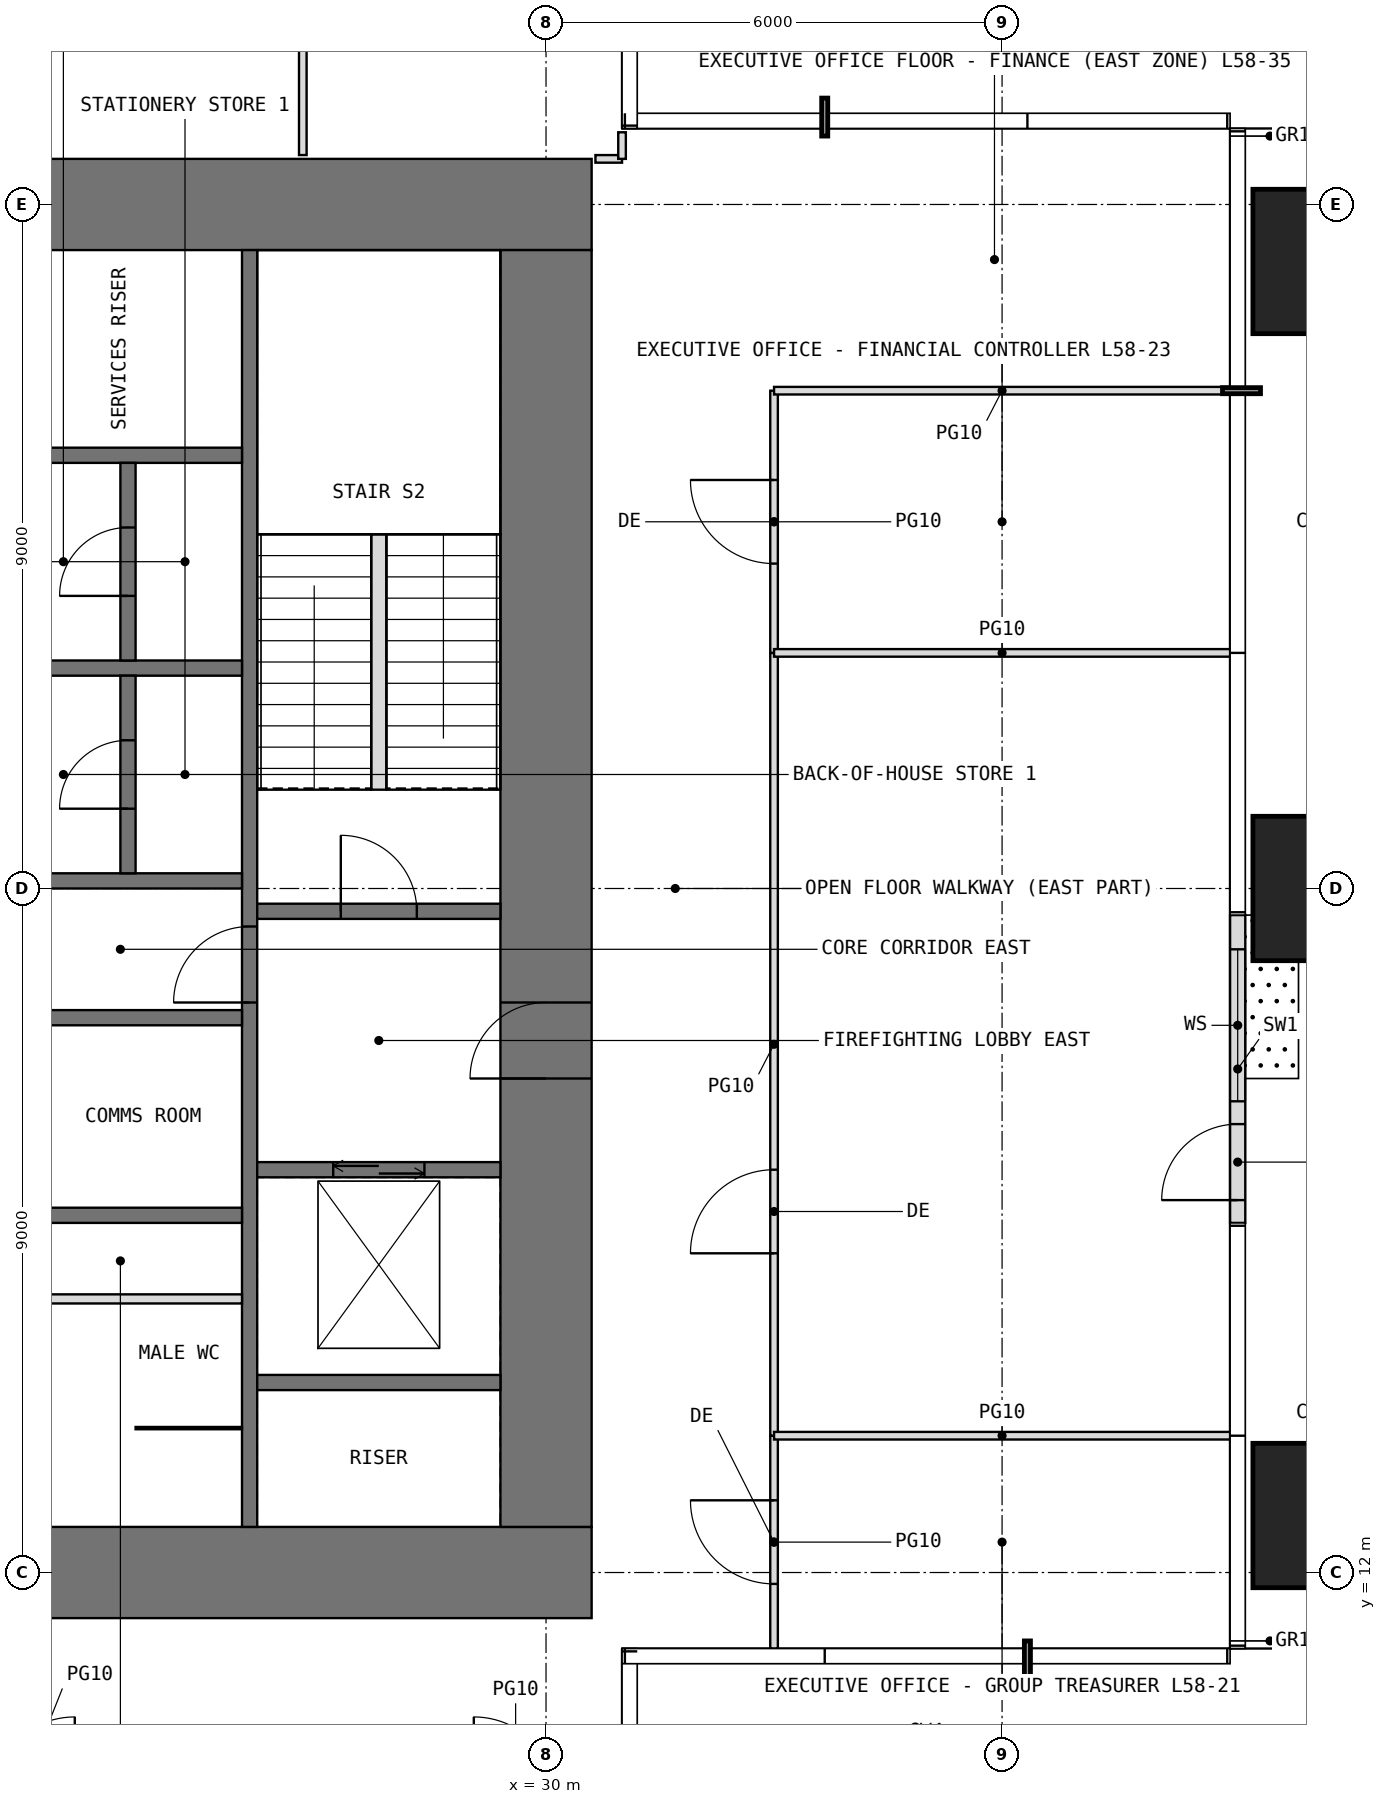
"""IFC4 building model, lengths in metres.
Left out: names, types, materials, properties, quantities, classifications, styles, units other than length and angle.
Written with IfcOpenShell. Run it as: python <this file> out.ifc"""

import sys

from ifc_helpers import new_model, si_unit, direction, frame, frame_2d, origin, origin_2d, place, context, subcontext, project, spatial, rectangle, extrude, element, fill, save


model = new_model("IFC4")
c1 = context("Model", 3, precision=1e-05, world=origin(), true_north=direction((0.0, 1.0)))
c2 = subcontext(c1, "Body", "Model", "MODEL_VIEW")
j1 = project(units=[si_unit("LENGTHUNIT", "METRE"), si_unit("PLANEANGLEUNIT", "RADIAN")], contexts=[c1])
p1 = place(None, origin())
s1 = spatial("IfcSite", under=j1, at=p1, CompositionType="ELEMENT")
p2 = place(p1, origin())
s2 = spatial("IfcBuilding", under=s1, at=p2, CompositionType="ELEMENT")
p3 = place(p2, frame((0.0, 0.0, 244.0)))
s3 = spatial("IfcBuildingStorey", under=s2, at=p3, CompositionType="ELEMENT", Elevation=244.0)
for number, where, z_axis, x_axis in (
    (1, (40.25, 12.75, 0.0), (0.0, 0.0, 1.0), (1.0, 0.0, 0.0)),
    (2, (40.25, 21.0, 0.0), (0.0, 0.0, 1.0), (1.0, 0.0, 0.0)),
    (3, (40.25, 29.25, 0.0), (0.0, 0.0, 1.0), (1.0, 0.0, 0.0)),
):
    element("IfcColumn", number, at=place(p3, frame(where, z_axis=z_axis, x_axis=x_axis)), inside=s3, PredefinedType="COLUMN", context=c2, shape_type="SweptSolid", body=[
        extrude(rectangle(XDim=1.9, YDim=1.9, at=origin_2d()), origin(), (0.0, 0.0, 1.0), 4.2),
    ])
p4 = place(p3, frame((39.1, 16.6, 0.0), z_axis=(0.0, 0.0, 1.0), x_axis=(0.0, 1.0, 0.0)))
e4 = element("IfcWall", 4, at=p4, inside=s3, PredefinedType="USERDEFINED", context=c2, shape_type="SweptSolid", body=[
    extrude(rectangle(XDim=4.05, YDim=0.2, at=frame_2d((2.025, 0.0))), origin(), (0.0, 0.0, 1.0), 3.95),
])
p5 = place(p4, frame((0.3, 0.0, 0.0)))
e5 = element("IfcOpeningElement", 5, at=p5, cuts=e4, PredefinedType="OPENING", context=c2, shape_type="SweptSolid", body=[
    extrude(rectangle(XDim=1.0, YDim=2.4, at=frame_2d((0.5, 1.2))), frame((0.0, 0.11, 0.0), z_axis=(0.0, -1.0, 0.0), x_axis=(1.0, 0.0, 0.0)), (0.0, 0.0, 1.0), 0.22),
])
p6 = place(p4, frame((1.6, 0.0, 0.3)))
e6 = element("IfcOpeningElement", 6, at=p6, cuts=e4, PredefinedType="OPENING", context=c2, shape_type="SweptSolid", body=[
    extrude(rectangle(XDim=2.0, YDim=2.7, at=frame_2d((1.0, 1.35))), frame((0.0, 0.11, 0.0), z_axis=(0.0, -1.0, 0.0), x_axis=(1.0, 0.0, 0.0)), (0.0, 0.0, 1.0), 0.22),
])
p7 = place(p3, frame((11.4, 12.0, -0.05), z_axis=(0.0, 0.0, 1.0), x_axis=(1.0, 0.0, 0.0)))
e7 = element("IfcWall", 7, at=p7, inside=s3, PredefinedType="SHEAR", context=c2, shape_type="SweptSolid", body=[
    extrude(rectangle(XDim=19.2, YDim=1.2, at=frame_2d((9.6, 0.0))), origin(), (0.0, 0.0, 1.0), 4.2),
])
p8 = place(p7, frame((8.6, 0.0, 0.05)))
e8 = element("IfcOpeningElement", 8, at=p8, cuts=e7, PredefinedType="OPENING", context=c2, shape_type="SweptSolid", body=[
    extrude(rectangle(XDim=2.0, YDim=2.2, at=frame_2d((1.0, 1.1))), frame((0.0, 0.61, 0.0), z_axis=(0.0, -1.0, 0.0), x_axis=(1.0, 0.0, 0.0)), (0.0, 0.0, 1.0), 1.22),
])
p9 = place(p3, frame((11.4, 30.0, -0.05), z_axis=(0.0, 0.0, 1.0), x_axis=(1.0, 0.0, 0.0)))
e9 = element("IfcWall", 9, at=p9, inside=s3, PredefinedType="SHEAR", context=c2, shape_type="SweptSolid", body=[
    extrude(rectangle(XDim=19.2, YDim=1.2, at=frame_2d((9.6, 0.0))), origin(), (0.0, 0.0, 1.0), 4.2),
])
p10 = place(p9, frame((8.6, 0.0, 0.05)))
e10 = element("IfcOpeningElement", 10, at=p10, cuts=e9, PredefinedType="OPENING", context=c2, shape_type="SweptSolid", body=[
    extrude(rectangle(XDim=2.0, YDim=2.2, at=frame_2d((1.0, 1.1))), frame((0.0, 0.61, 0.0), z_axis=(0.0, -1.0, 0.0), x_axis=(1.0, 0.0, 0.0)), (0.0, 0.0, 1.0), 1.22),
])
p11 = place(p3, frame((30.0, 12.6, -0.05), z_axis=(0.0, 0.0, 1.0), x_axis=(0.0, 1.0, 0.0)))
e11 = element("IfcWall", 11, at=p11, inside=s3, PredefinedType="SHEAR", context=c2, shape_type="SweptSolid", body=[
    extrude(rectangle(XDim=16.8, YDim=1.2, at=frame_2d((8.4, 0.0))), origin(), (0.0, 0.0, 1.0), 4.2),
])
p12 = place(p11, frame((5.9, 0.0, 0.05)))
e12 = element("IfcOpeningElement", 12, at=p12, cuts=e11, PredefinedType="OPENING", context=c2, shape_type="SweptSolid", body=[
    extrude(rectangle(XDim=1.0, YDim=2.2, at=frame_2d((0.5, 1.1))), frame((0.0, 0.61, 0.0), z_axis=(0.0, -1.0, 0.0), x_axis=(1.0, 0.0, 0.0)), (0.0, 0.0, 1.0), 1.22),
])
p13 = place(p3, frame((26.1, 12.6, -0.05), z_axis=(0.0, 0.0, 1.0), x_axis=(0.0, 1.0, 0.0)))
e13 = element("IfcWall", 13, at=p13, inside=s3, PredefinedType="SHEAR", context=c2, shape_type="SweptSolid", body=[
    extrude(rectangle(XDim=16.8, YDim=0.2, at=frame_2d((8.4, 0.0))), origin(), (0.0, 0.0, 1.0), 4.2),
])
p14 = place(p13, frame((6.9, 0.0, 0.05)))
e14 = element("IfcOpeningElement", 14, at=p14, cuts=e13, PredefinedType="OPENING", context=c2, shape_type="SweptSolid", body=[
    extrude(rectangle(XDim=1.0, YDim=2.2, at=frame_2d((0.5, 1.1))), frame((0.0, 0.11, 0.0), z_axis=(0.0, -1.0, 0.0), x_axis=(1.0, 0.0, 0.0)), (0.0, 0.0, 1.0), 0.22),
])
for number, where, z_axis, x_axis in (
    (15, (22.8, 16.7, -0.05), (0.0, 0.0, 1.0), (1.0, 0.0, 0.0)),
    (16, (22.8, 19.3, -0.05), (0.0, 0.0, 1.0), (1.0, 0.0, 0.0)),
    (17, (22.8, 21.1, -0.05), (0.0, 0.0, 1.0), (1.0, 0.0, 0.0)),
    (18, (22.8, 23.9, -0.05), (0.0, 0.0, 1.0), (1.0, 0.0, 0.0)),
    (19, (22.8, 26.7, -0.05), (0.0, 0.0, 1.0), (1.0, 0.0, 0.0)),
    (20, (26.2, 14.5, -0.05), (0.0, 0.0, 1.0), (1.0, 0.0, 0.0)),
):
    element("IfcWall", number, at=place(p3, frame(where, z_axis=z_axis, x_axis=x_axis)), inside=s3, PredefinedType="SHEAR", context=c2, shape_type="SweptSolid", body=[
        extrude(rectangle(XDim=3.2, YDim=0.2, at=frame_2d((1.6, 0.0))), origin(), (0.0, 0.0, 1.0), 4.2),
    ])
p15 = place(p3, frame((26.2, 17.3, -0.05), z_axis=(0.0, 0.0, 1.0), x_axis=(1.0, 0.0, 0.0)))
e21 = element("IfcWall", 21, at=p15, inside=s3, PredefinedType="SHEAR", context=c2, shape_type="SweptSolid", body=[
    extrude(rectangle(XDim=3.2, YDim=0.2, at=frame_2d((1.6, 0.0))), origin(), (0.0, 0.0, 1.0), 4.2),
])
p16 = place(p15, frame((1.0, 0.0, 0.05)))
e22 = element("IfcOpeningElement", 22, at=p16, cuts=e21, PredefinedType="OPENING", context=c2, shape_type="SweptSolid", body=[
    extrude(rectangle(XDim=1.2, YDim=2.2, at=frame_2d((0.6, 1.1))), frame((0.0, 0.11, 0.0), z_axis=(0.0, -1.0, 0.0), x_axis=(1.0, 0.0, 0.0)), (0.0, 0.0, 1.0), 0.22),
])
p17 = place(p3, frame((26.2, 20.7, -0.05), z_axis=(0.0, 0.0, 1.0), x_axis=(1.0, 0.0, 0.0)))
e23 = element("IfcWall", 23, at=p17, inside=s3, PredefinedType="SHEAR", context=c2, shape_type="SweptSolid", body=[
    extrude(rectangle(XDim=3.2, YDim=0.2, at=frame_2d((1.6, 0.0))), origin(), (0.0, 0.0, 1.0), 4.2),
])
p18 = place(p17, frame((1.1, 0.0, 0.05)))
e24 = element("IfcOpeningElement", 24, at=p18, cuts=e23, PredefinedType="OPENING", context=c2, shape_type="SweptSolid", body=[
    extrude(rectangle(XDim=1.0, YDim=2.2, at=frame_2d((0.5, 1.1))), frame((0.0, 0.11, 0.0), z_axis=(0.0, -1.0, 0.0), x_axis=(1.0, 0.0, 0.0)), (0.0, 0.0, 1.0), 0.22),
])
p19 = place(p3, frame((22.8, 15.6, 0.0), z_axis=(0.0, 0.0, 1.0), x_axis=(1.0, 0.0, 0.0)))
e25 = element("IfcWall", 25, at=p19, inside=s3, PredefinedType="PARTITIONING", context=c2, shape_type="SweptSolid", body=[
    extrude(rectangle(XDim=3.2, YDim=0.12, at=frame_2d((1.6, 0.0))), origin(), (0.0, 0.0, 1.0), 3.95),
])
p20 = place(p3, frame((24.6, 13.9, 0.0), z_axis=(0.0, 0.0, 1.0), x_axis=(1.0, 0.0, 0.0)))
e26 = element("IfcWall", 26, at=p20, inside=s3, PredefinedType="PARTITIONING", context=c2, shape_type="SweptSolid", body=[
    extrude(rectangle(XDim=1.4, YDim=0.03, at=frame_2d((0.7, 0.0))), origin(), (0.0, 0.0, 1.0), 3.95),
])
p21 = place(p3, frame((24.5, 21.2, -0.05), z_axis=(0.0, 0.0, 1.0), x_axis=(0.0, 1.0, 0.0)))
e27 = element("IfcWall", 27, at=p21, inside=s3, PredefinedType="SHEAR", context=c2, shape_type="SweptSolid", body=[
    extrude(rectangle(XDim=2.6, YDim=0.2, at=frame_2d((1.3, 0.0))), origin(), (0.0, 0.0, 1.0), 4.2),
])
p22 = place(p21, frame((0.85, 0.0, 0.05)))
e28 = element("IfcOpeningElement", 28, at=p22, cuts=e27, PredefinedType="OPENING", context=c2, shape_type="SweptSolid", body=[
    extrude(rectangle(XDim=0.9, YDim=2.2, at=frame_2d((0.45, 1.1))), frame((0.0, 0.11, 0.0), z_axis=(0.0, -1.0, 0.0), x_axis=(1.0, 0.0, 0.0)), (0.0, 0.0, 1.0), 0.22),
])
p23 = place(p3, frame((24.5, 24.0, -0.05), z_axis=(0.0, 0.0, 1.0), x_axis=(0.0, 1.0, 0.0)))
e29 = element("IfcWall", 29, at=p23, inside=s3, PredefinedType="SHEAR", context=c2, shape_type="SweptSolid", body=[
    extrude(rectangle(XDim=2.6, YDim=0.2, at=frame_2d((1.3, 0.0))), origin(), (0.0, 0.0, 1.0), 4.2),
])
p24 = place(p23, frame((0.85, 0.0, 0.05)))
e30 = element("IfcOpeningElement", 30, at=p24, cuts=e29, PredefinedType="OPENING", context=c2, shape_type="SweptSolid", body=[
    extrude(rectangle(XDim=0.9, YDim=2.2, at=frame_2d((0.45, 1.1))), frame((0.0, 0.11, 0.0), z_axis=(0.0, -1.0, 0.0), x_axis=(1.0, 0.0, 0.0)), (0.0, 0.0, 1.0), 0.22),
])
p25 = place(p3, frame((26.8, 30.65, 0.0), z_axis=(0.0, 0.0, 1.0), x_axis=(0.0, 1.0, 0.0)))
e31 = element("IfcWall", 31, at=p25, inside=s3, PredefinedType="PARTITIONING", context=c2, shape_type="SweptSolid", body=[
    extrude(rectangle(XDim=3.45, YDim=0.1, at=frame_2d((1.725, 0.0))), origin(), (0.0, 0.0, 1.0), 3.95),
])
p26 = place(p3, frame((30.65, 30.6, 0.0), z_axis=(0.0, 0.0, 1.0), x_axis=(1.0, 0.0, 0.0)))
e32 = element("IfcWall", 32, at=p26, inside=s3, PredefinedType="PARTITIONING", context=c2, shape_type="SweptSolid", body=[
    extrude(rectangle(XDim=0.35, YDim=0.1, at=frame_2d((0.175, 0.0))), origin(), (0.0, 0.0, 1.0), 3.95),
])
p27 = place(p3, frame((31.0, 30.6, 0.0), z_axis=(0.0, 0.0, 1.0), x_axis=(0.0, 1.0, 0.0)))
e33 = element("IfcWall", 33, at=p27, inside=s3, PredefinedType="PARTITIONING", context=c2, shape_type="SweptSolid", body=[
    extrude(rectangle(XDim=0.35, YDim=0.1, at=frame_2d((0.175, 0.0))), origin(), (0.0, 0.0, 1.0), 3.95),
])
p28 = place(p3, frame((33.0, 11.0, 0.0), z_axis=(0.0, 0.0, 1.0), x_axis=(0.0, 1.0, 0.0)))
e34 = element("IfcWall", 34, at=p28, inside=s3, PredefinedType="PARTITIONING", context=c2, shape_type="SweptSolid", body=[
    extrude(rectangle(XDim=2.8, YDim=0.1, at=frame_2d((1.4, 0.0))), origin(), (0.0, 0.0, 1.0), 3.95),
])
p29 = place(p28, frame((0.85, 0.0, 0.0)))
e35 = element("IfcOpeningElement", 35, at=p29, cuts=e34, PredefinedType="OPENING", context=c2, shape_type="SweptSolid", body=[
    extrude(rectangle(XDim=1.1, YDim=2.3, at=frame_2d((0.55, 1.15))), frame((0.0, 0.06, 0.0), z_axis=(0.0, -1.0, 0.0), x_axis=(1.0, 0.0, 0.0)), (0.0, 0.0, 1.0), 0.12),
])
p30 = place(p3, frame((33.0, 13.8, 0.0), z_axis=(0.0, 0.0, 1.0), x_axis=(0.0, 1.0, 0.0)))
e36 = element("IfcWall", 36, at=p30, inside=s3, PredefinedType="PARTITIONING", context=c2, shape_type="SweptSolid", body=[
    extrude(rectangle(XDim=10.3, YDim=0.1, at=frame_2d((5.15, 0.0))), origin(), (0.0, 0.0, 1.0), 3.95),
])
p31 = place(p30, frame((2.4, 0.0, 0.0)))
e37 = element("IfcOpeningElement", 37, at=p31, cuts=e36, PredefinedType="OPENING", context=c2, shape_type="SweptSolid", body=[
    extrude(rectangle(XDim=1.1, YDim=2.3, at=frame_2d((0.55, 1.15))), frame((0.0, 0.06, 0.0), z_axis=(0.0, -1.0, 0.0), x_axis=(1.0, 0.0, 0.0)), (0.0, 0.0, 1.0), 0.12),
])
p32 = place(p3, frame((33.0, 13.8, 0.0), z_axis=(0.0, 0.0, 1.0), x_axis=(1.0, 0.0, 0.0)))
e38 = element("IfcWall", 38, at=p32, inside=s3, PredefinedType="PARTITIONING", context=c2, shape_type="SweptSolid", body=[
    extrude(rectangle(XDim=6.0, YDim=0.1, at=frame_2d((3.0, 0.0))), origin(), (0.0, 0.0, 1.0), 3.95),
])
p33 = place(p3, frame((33.0, 24.1, 0.0), z_axis=(0.0, 0.0, 1.0), x_axis=(0.0, 1.0, 0.0)))
e39 = element("IfcWall", 39, at=p33, inside=s3, PredefinedType="PARTITIONING", context=c2, shape_type="SweptSolid", body=[
    extrude(rectangle(XDim=3.45, YDim=0.1, at=frame_2d((1.725, 0.0))), origin(), (0.0, 0.0, 1.0), 3.95),
])
p34 = place(p33, frame((1.175, 0.0, 0.0)))
e40 = element("IfcOpeningElement", 40, at=p34, cuts=e39, PredefinedType="OPENING", context=c2, shape_type="SweptSolid", body=[
    extrude(rectangle(XDim=1.1, YDim=2.3, at=frame_2d((0.55, 1.15))), frame((0.0, 0.06, 0.0), z_axis=(0.0, -1.0, 0.0), x_axis=(1.0, 0.0, 0.0)), (0.0, 0.0, 1.0), 0.12),
])
for number, where, z_axis, x_axis in (
    (41, (33.0, 24.1, 0.0), (0.0, 0.0, 1.0), (1.0, 0.0, 0.0)),
    (42, (33.0, 27.55, 0.0), (0.0, 0.0, 1.0), (1.0, 0.0, 0.0)),
):
    element("IfcWall", number, at=place(p3, frame(where, z_axis=z_axis, x_axis=x_axis)), inside=s3, PredefinedType="PARTITIONING", context=c2, shape_type="SweptSolid", body=[
        extrude(rectangle(XDim=6.0, YDim=0.1, at=frame_2d((3.0, 0.0))), origin(), (0.0, 0.0, 1.0), 3.95),
    ])
p35 = place(p3, frame((27.8, 22.3, 0.0), z_axis=(0.0, 0.0, 1.0), x_axis=(0.0, 1.0, 0.0)))
e43 = element("IfcWall", 43, at=p35, inside=s3, PredefinedType="PARTITIONING", context=c2, shape_type="SweptSolid", body=[
    extrude(rectangle(XDim=3.36, YDim=0.2, at=frame_2d((1.68, 0.0))), origin(), (0.0, 0.0, 1.0), 4.2),
])
p36 = place(p5, origin())
e44 = element("IfcDoor", 44, at=p36, inside=s3, OperationType="SINGLE_SWING_LEFT", PredefinedType="DOOR", context=c2, shape_type="SweptSolid", body=[
    extrude(rectangle(XDim=1.0, YDim=2.4, at=frame_2d((0.5, 1.2))), frame((0.0, 0.025, 0.0), z_axis=(0.0, -1.0, 0.0), x_axis=(1.0, 0.0, 0.0)), (0.0, 0.0, 1.0), 0.05),
])
fill(e5, e44)
p37 = place(p6, origin())
e45 = element("IfcWindow", 45, at=p37, inside=s3, PartitioningType="SINGLE_PANEL", PredefinedType="WINDOW", context=c2, shape_type="SweptSolid", body=[
    extrude(rectangle(XDim=2.0, YDim=2.7, at=frame_2d((1.0, 1.35))), frame((0.0, 0.03, 0.0), z_axis=(0.0, -1.0, 0.0), x_axis=(1.0, 0.0, 0.0)), (0.0, 0.0, 1.0), 0.06),
])
fill(e6, e45)
p38 = place(p12, origin())
e46 = element("IfcDoor", 46, at=p38, inside=s3, OperationType="SINGLE_SWING_LEFT", PredefinedType="DOOR", context=c2, shape_type="SweptSolid", body=[
    extrude(rectangle(XDim=1.0, YDim=2.2, at=frame_2d((0.5, 1.1))), frame((0.0, 0.025, 0.0), z_axis=(0.0, -1.0, 0.0), x_axis=(1.0, 0.0, 0.0)), (0.0, 0.0, 1.0), 0.05),
])
fill(e12, e46)
p39 = place(p18, origin())
e47 = element("IfcDoor", 47, at=p39, inside=s3, OperationType="SINGLE_SWING_LEFT", PredefinedType="DOOR", context=c2, shape_type="SweptSolid", body=[
    extrude(rectangle(XDim=1.0, YDim=2.2, at=frame_2d((0.5, 1.1))), frame((0.0, 0.025, 0.0), z_axis=(0.0, -1.0, 0.0), x_axis=(1.0, 0.0, 0.0)), (0.0, 0.0, 1.0), 0.05),
])
fill(e24, e47)
p40 = place(p14, origin())
e48 = element("IfcDoor", 48, at=p40, inside=s3, OperationType="SINGLE_SWING_LEFT", PredefinedType="DOOR", context=c2, shape_type="SweptSolid", body=[
    extrude(rectangle(XDim=1.0, YDim=2.2, at=frame_2d((0.5, 1.1))), frame((0.0, 0.025, 0.0), z_axis=(0.0, -1.0, 0.0), x_axis=(1.0, 0.0, 0.0)), (0.0, 0.0, 1.0), 0.05),
])
fill(e14, e48)
p41 = place(p22, origin())
e49 = element("IfcDoor", 49, at=p41, inside=s3, OperationType="SINGLE_SWING_LEFT", PredefinedType="DOOR", context=c2, shape_type="SweptSolid", body=[
    extrude(rectangle(XDim=0.9, YDim=2.2, at=frame_2d((0.45, 1.1))), frame((0.0, 0.025, 0.0), z_axis=(0.0, -1.0, 0.0), x_axis=(1.0, 0.0, 0.0)), (0.0, 0.0, 1.0), 0.05),
])
fill(e28, e49)
p42 = place(p24, origin())
e50 = element("IfcDoor", 50, at=p42, inside=s3, OperationType="SINGLE_SWING_LEFT", PredefinedType="DOOR", context=c2, shape_type="SweptSolid", body=[
    extrude(rectangle(XDim=0.9, YDim=2.2, at=frame_2d((0.45, 1.1))), frame((0.0, 0.025, 0.0), z_axis=(0.0, -1.0, 0.0), x_axis=(1.0, 0.0, 0.0)), (0.0, 0.0, 1.0), 0.05),
])
fill(e30, e50)
p43 = place(p29, origin())
e51 = element("IfcDoor", 51, at=p43, inside=s3, OperationType="SINGLE_SWING_RIGHT", PredefinedType="DOOR", context=c2, shape_type="SweptSolid", body=[
    extrude(rectangle(XDim=1.1, YDim=2.3, at=frame_2d((0.55, 1.15))), frame((0.0, 0.025, 0.0), z_axis=(0.0, -1.0, 0.0), x_axis=(1.0, 0.0, 0.0)), (0.0, 0.0, 1.0), 0.05),
])
fill(e35, e51)
p44 = place(p31, origin())
e52 = element("IfcDoor", 52, at=p44, inside=s3, OperationType="SINGLE_SWING_LEFT", PredefinedType="DOOR", context=c2, shape_type="SweptSolid", body=[
    extrude(rectangle(XDim=1.1, YDim=2.3, at=frame_2d((0.55, 1.15))), frame((0.0, 0.025, 0.0), z_axis=(0.0, -1.0, 0.0), x_axis=(1.0, 0.0, 0.0)), (0.0, 0.0, 1.0), 0.05),
])
fill(e37, e52)
p45 = place(p34, origin())
e53 = element("IfcDoor", 53, at=p45, inside=s3, OperationType="SINGLE_SWING_RIGHT", PredefinedType="DOOR", context=c2, shape_type="SweptSolid", body=[
    extrude(rectangle(XDim=1.1, YDim=2.3, at=frame_2d((0.55, 1.15))), frame((0.0, 0.025, 0.0), z_axis=(0.0, -1.0, 0.0), x_axis=(1.0, 0.0, 0.0)), (0.0, 0.0, 1.0), 0.05),
])
fill(e40, e53)
p46 = place(p16, origin())
e54 = element("IfcDoor", 54, at=p46, inside=s3, OperationType="DOUBLE_DOOR_SLIDING", PredefinedType="DOOR", context=c2, shape_type="SweptSolid", body=[
    extrude(rectangle(XDim=1.2, YDim=2.2, at=frame_2d((0.6, 1.1))), frame((0.0, 0.025, 0.0), z_axis=(0.0, -1.0, 0.0), x_axis=(1.0, 0.0, 0.0)), (0.0, 0.0, 1.0), 0.05),
])
fill(e22, e54)
save(model, sys.argv[1])
